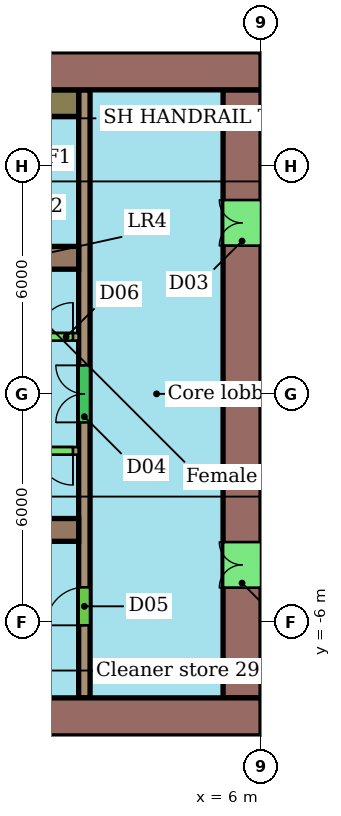
"""IFC4 building model, lengths in metres.
Left out: names, types, materials, properties, quantities, classifications, styles, units other than length and angle.
Written with IfcOpenShell. Run it as: python <this file> out.ifc"""

import sys

from ifc_helpers import new_model, si_unit, direction, frame, frame_2d, origin, place, context, subcontext, project, spatial, rectangle, extrude, element, fill, save


model = new_model("IFC4")
c1 = context("Model", 3, precision=1e-05, world=origin(), true_north=direction((0.0, 1.0)))
c2 = subcontext(c1, "Body", "Model", "MODEL_VIEW")
j1 = project(units=[si_unit("LENGTHUNIT", "METRE"), si_unit("PLANEANGLEUNIT", "RADIAN")], contexts=[c1])
p1 = place(None, origin())
s1 = spatial("IfcSite", under=j1, at=p1, CompositionType="ELEMENT")
p2 = place(p1, origin())
s2 = spatial("IfcBuilding", under=s1, at=p2, CompositionType="ELEMENT")
p3 = place(p2, frame((0.0, 0.0, 124.6)))
s3 = spatial("IfcBuildingStorey", under=s2, at=p3, CompositionType="ELEMENT", Elevation=124.6)
p4 = place(p3, frame((6.0, 8.5, 0.0), z_axis=(0.0, 0.0, 1.0), x_axis=(-1.0, 0.0, 0.0)))
e1 = element("IfcWall", 1, at=p4, inside=s3, PredefinedType="SHEAR", context=c2, shape_type="SweptSolid", body=[
    extrude(rectangle(XDim=12.0, YDim=1.0, at=frame_2d((6.0, 0.0))), origin(), (0.0, 0.0, 1.0), 3.3),
])
p5 = place(p4, frame((5.6, 0.0, 0.0)))
e2 = element("IfcOpeningElement", 2, at=p5, cuts=e1, PredefinedType="OPENING", context=c2, shape_type="SweptSolid", body=[
    extrude(rectangle(XDim=1.2, YDim=2.1, at=frame_2d((0.6, 1.05))), frame((0.0, 0.51, 0.0), z_axis=(0.0, -1.0, 0.0), x_axis=(1.0, 0.0, 0.0)), (0.0, 0.0, 1.0), 1.02),
])
p6 = place(p3, frame((-18.0, -8.5, 0.0), z_axis=(0.0, 0.0, 1.0), x_axis=(1.0, 0.0, 0.0)))
e3 = element("IfcWall", 3, at=p6, inside=s3, PredefinedType="SHEAR", context=c2, shape_type="SweptSolid", body=[
    extrude(rectangle(XDim=24.0, YDim=1.0, at=frame_2d((12.0, 0.0))), origin(), (0.0, 0.0, 1.0), 3.3),
])
p7 = place(p6, frame((6.0, 0.0, 0.0)))
e4 = element("IfcOpeningElement", 4, at=p7, cuts=e3, PredefinedType="OPENING", context=c2, shape_type="SweptSolid", body=[
    extrude(rectangle(XDim=1.2, YDim=2.1, at=frame_2d((0.6, 1.05))), frame((0.0, 0.51, 0.0), z_axis=(0.0, -1.0, 0.0), x_axis=(1.0, 0.0, 0.0)), (0.0, 0.0, 1.0), 1.02),
])
p8 = place(p3, frame((5.5, -8.0, 0.0), z_axis=(0.0, 0.0, 1.0), x_axis=(0.0, 1.0, 0.0)))
e5 = element("IfcWall", 5, at=p8, inside=s3, PredefinedType="SHEAR", context=c2, shape_type="SweptSolid", body=[
    extrude(rectangle(XDim=16.0, YDim=1.0, at=frame_2d((8.0, 0.0))), origin(), (0.0, 0.0, 1.0), 3.3),
])
p9 = place(p8, frame((2.9, 0.0, 0.0)))
e6 = element("IfcOpeningElement", 6, at=p9, cuts=e5, PredefinedType="OPENING", context=c2, shape_type="SweptSolid", body=[
    extrude(rectangle(XDim=1.2, YDim=2.1, at=frame_2d((0.6, 1.05))), frame((0.0, 0.51, 0.0), z_axis=(0.0, -1.0, 0.0), x_axis=(1.0, 0.0, 0.0)), (0.0, 0.0, 1.0), 1.02),
])
p10 = place(p8, frame((11.9, 0.0, 0.0)))
e7 = element("IfcOpeningElement", 7, at=p10, cuts=e5, PredefinedType="OPENING", context=c2, shape_type="SweptSolid", body=[
    extrude(rectangle(XDim=1.2, YDim=2.1, at=frame_2d((0.6, 1.05))), frame((0.0, 0.51, 0.0), z_axis=(0.0, -1.0, 0.0), x_axis=(1.0, 0.0, 0.0)), (0.0, 0.0, 1.0), 1.02),
])
for number, where, z_axis, x_axis in (
    (8, (-6.0, 3.58, 0.0), (0.0, 0.0, 1.0), (1.0, 0.0, 0.0)),
    (9, (-6.0, -3.58, 0.0), (0.0, 0.0, 1.0), (1.0, 0.0, 0.0)),
):
    element("IfcWall", number, at=place(p3, frame(where, z_axis=z_axis, x_axis=x_axis)), inside=s3, PredefinedType="SHEAR", context=c2, shape_type="SweptSolid", body=[
        extrude(rectangle(XDim=7.2, YDim=0.6, at=frame_2d((3.6, 0.0))), origin(), (0.0, 0.0, 1.0), 3.3),
    ])
p11 = place(p3, frame((1.35, -8.0, 0.0), z_axis=(0.0, 0.0, 1.0), x_axis=(0.0, 1.0, 0.0)))
e10 = element("IfcWall", 10, at=p11, inside=s3, PredefinedType="SHEAR", context=c2, shape_type="SweptSolid", body=[
    extrude(rectangle(XDim=16.0, YDim=0.3, at=frame_2d((8.0, 0.0))), origin(), (0.0, 0.0, 1.0), 3.3),
])
p12 = place(p11, frame((1.91, 0.0, 0.0)))
e11 = element("IfcOpeningElement", 11, at=p12, cuts=e10, PredefinedType="OPENING", context=c2, shape_type="SweptSolid", body=[
    extrude(rectangle(XDim=1.0, YDim=2.1, at=frame_2d((0.5, 1.05))), frame((0.0, 0.16, 0.0), z_axis=(0.0, -1.0, 0.0), x_axis=(1.0, 0.0, 0.0)), (0.0, 0.0, 1.0), 0.32),
])
p13 = place(p11, frame((7.25, 0.0, 0.0)))
e12 = element("IfcOpeningElement", 12, at=p13, cuts=e10, PredefinedType="OPENING", context=c2, shape_type="SweptSolid", body=[
    extrude(rectangle(XDim=1.5, YDim=2.1, at=frame_2d((0.75, 1.05))), frame((0.0, 0.16, 0.0), z_axis=(0.0, -1.0, 0.0), x_axis=(1.0, 0.0, 0.0)), (0.0, 0.0, 1.0), 0.32),
])
p14 = place(p3, frame((-13.2, 1.5, 0.0), z_axis=(0.0, 0.0, 1.0), x_axis=(1.0, 0.0, 0.0)))
e13 = element("IfcWall", 13, at=p14, inside=s3, PredefinedType="SHEAR", context=c2, shape_type="SweptSolid", body=[
    extrude(rectangle(XDim=14.4, YDim=0.2, at=frame_2d((7.2, 0.0))), origin(), (0.0, 0.0, 1.0), 3.3),
])
p15 = place(p14, frame((0.546, 0.0, 0.0)))
e14 = element("IfcOpeningElement", 14, at=p15, cuts=e13, PredefinedType="OPENING", context=c2, shape_type="SweptSolid", body=[
    extrude(rectangle(XDim=1.1, YDim=2.1, at=frame_2d((0.55, 1.05))), frame((0.0, 0.11, 0.0), z_axis=(0.0, -1.0, 0.0), x_axis=(1.0, 0.0, 0.0)), (0.0, 0.0, 1.0), 0.22),
])
p16 = place(p14, frame((2.988, 0.0, 0.0)))
e15 = element("IfcOpeningElement", 15, at=p16, cuts=e13, PredefinedType="OPENING", context=c2, shape_type="SweptSolid", body=[
    extrude(rectangle(XDim=1.1, YDim=2.1, at=frame_2d((0.55, 1.05))), frame((0.0, 0.11, 0.0), z_axis=(0.0, -1.0, 0.0), x_axis=(1.0, 0.0, 0.0)), (0.0, 0.0, 1.0), 0.22),
])
p17 = place(p14, frame((5.429, 0.0, 0.0)))
e16 = element("IfcOpeningElement", 16, at=p17, cuts=e13, PredefinedType="OPENING", context=c2, shape_type="SweptSolid", body=[
    extrude(rectangle(XDim=1.1, YDim=2.1, at=frame_2d((0.55, 1.05))), frame((0.0, 0.11, 0.0), z_axis=(0.0, -1.0, 0.0), x_axis=(1.0, 0.0, 0.0)), (0.0, 0.0, 1.0), 0.22),
])
p18 = place(p14, frame((7.871, 0.0, 0.0)))
e17 = element("IfcOpeningElement", 17, at=p18, cuts=e13, PredefinedType="OPENING", context=c2, shape_type="SweptSolid", body=[
    extrude(rectangle(XDim=1.1, YDim=2.1, at=frame_2d((0.55, 1.05))), frame((0.0, 0.11, 0.0), z_axis=(0.0, -1.0, 0.0), x_axis=(1.0, 0.0, 0.0)), (0.0, 0.0, 1.0), 0.22),
])
p19 = place(p14, frame((10.21, 0.0, 0.0)))
e18 = element("IfcOpeningElement", 18, at=p19, cuts=e13, PredefinedType="OPENING", context=c2, shape_type="SweptSolid", body=[
    extrude(rectangle(XDim=1.0, YDim=2.1, at=frame_2d((0.5, 1.05))), frame((0.0, 0.11, 0.0), z_axis=(0.0, -1.0, 0.0), x_axis=(1.0, 0.0, 0.0)), (0.0, 0.0, 1.0), 0.22),
])
p20 = place(p14, frame((13.35, 0.0, 0.0)))
e19 = element("IfcOpeningElement", 19, at=p20, cuts=e13, PredefinedType="OPENING", context=c2, shape_type="SweptSolid", body=[
    extrude(rectangle(XDim=0.9, YDim=2.1, at=frame_2d((0.45, 1.05))), frame((0.0, 0.11, 0.0), z_axis=(0.0, -1.0, 0.0), x_axis=(1.0, 0.0, 0.0)), (0.0, 0.0, 1.0), 0.22),
])
p21 = place(p3, frame((1.2, -1.5, 0.0), z_axis=(0.0, 0.0, 1.0), x_axis=(-1.0, 0.0, 0.0)))
e20 = element("IfcWall", 20, at=p21, inside=s3, PredefinedType="SHEAR", context=c2, shape_type="SweptSolid", body=[
    extrude(rectangle(XDim=14.4, YDim=0.2, at=frame_2d((7.2, 0.0))), origin(), (0.0, 0.0, 1.0), 3.3),
])
p22 = place(p21, frame((7.821, 0.0, 0.0)))
e21 = element("IfcOpeningElement", 21, at=p22, cuts=e20, PredefinedType="OPENING", context=c2, shape_type="SweptSolid", body=[
    extrude(rectangle(XDim=1.2, YDim=2.1, at=frame_2d((0.6, 1.05))), frame((0.0, 0.11, 0.0), z_axis=(0.0, -1.0, 0.0), x_axis=(1.0, 0.0, 0.0)), (0.0, 0.0, 1.0), 0.22),
])
p23 = place(p21, frame((0.15, 0.0, 0.0)))
e22 = element("IfcOpeningElement", 22, at=p23, cuts=e20, PredefinedType="OPENING", context=c2, shape_type="SweptSolid", body=[
    extrude(rectangle(XDim=0.9, YDim=2.1, at=frame_2d((0.45, 1.05))), frame((0.0, 0.11, 0.0), z_axis=(0.0, -1.0, 0.0), x_axis=(1.0, 0.0, 0.0)), (0.0, 0.0, 1.0), 0.22),
])
p24 = place(p3, frame((0.4, 7.65, 0.0), z_axis=(0.0, 0.0, 1.0), x_axis=(1.0, 0.0, 0.0)))
e23 = element("IfcWall", 23, at=p24, inside=s3, PredefinedType="SHEAR", context=c2, shape_type="SweptSolid", body=[
    extrude(rectangle(XDim=0.8, YDim=0.7, at=frame_2d((0.4, 0.0))), origin(), (0.0, 0.0, 1.0), 3.3),
])
p25 = place(p9, origin())
e24 = element("IfcDoor", 24, at=p25, inside=s3, OperationType="DOUBLE_DOOR_SINGLE_SWING", PredefinedType="NOTDEFINED", context=c2, shape_type="SweptSolid", body=[
    extrude(rectangle(XDim=1.2, YDim=2.1, at=frame_2d((0.6, 1.05))), frame((0.0, 0.025, 0.0), z_axis=(0.0, -1.0, 0.0), x_axis=(1.0, 0.0, 0.0)), (0.0, 0.0, 1.0), 0.05),
])
fill(e6, e24)
p26 = place(p10, origin())
e25 = element("IfcDoor", 25, at=p26, inside=s3, OperationType="DOUBLE_DOOR_SINGLE_SWING", PredefinedType="NOTDEFINED", context=c2, shape_type="SweptSolid", body=[
    extrude(rectangle(XDim=1.2, YDim=2.1, at=frame_2d((0.6, 1.05))), frame((0.0, 0.025, 0.0), z_axis=(0.0, -1.0, 0.0), x_axis=(1.0, 0.0, 0.0)), (0.0, 0.0, 1.0), 0.05),
])
fill(e7, e25)
p27 = place(p12, origin())
e26 = element("IfcDoor", 26, at=p27, inside=s3, OperationType="SINGLE_SWING_LEFT", PredefinedType="NOTDEFINED", context=c2, shape_type="SweptSolid", body=[
    extrude(rectangle(XDim=1.0, YDim=2.1, at=frame_2d((0.5, 1.05))), frame((0.0, 0.025, 0.0), z_axis=(0.0, -1.0, 0.0), x_axis=(1.0, 0.0, 0.0)), (0.0, 0.0, 1.0), 0.05),
])
fill(e11, e26)
p28 = place(p13, origin())
e27 = element("IfcDoor", 27, at=p28, inside=s3, OperationType="DOUBLE_DOOR_SINGLE_SWING", PredefinedType="NOTDEFINED", context=c2, shape_type="SweptSolid", body=[
    extrude(rectangle(XDim=1.5, YDim=2.1, at=frame_2d((0.75, 1.05))), frame((0.0, 0.025, 0.0), z_axis=(0.0, -1.0, 0.0), x_axis=(1.0, 0.0, 0.0)), (0.0, 0.0, 1.0), 0.05),
])
fill(e12, e27)
p29 = place(p20, origin())
e28 = element("IfcDoor", 28, at=p29, inside=s3, OperationType="SINGLE_SWING_RIGHT", PredefinedType="NOTDEFINED", context=c2, shape_type="SweptSolid", body=[
    extrude(rectangle(XDim=0.9, YDim=2.1, at=frame_2d((0.45, 1.05))), frame((0.0, 0.025, 0.0), z_axis=(0.0, -1.0, 0.0), x_axis=(1.0, 0.0, 0.0)), (0.0, 0.0, 1.0), 0.05),
])
fill(e19, e28)
p30 = place(p23, origin())
e29 = element("IfcDoor", 29, at=p30, inside=s3, OperationType="SINGLE_SWING_LEFT", PredefinedType="NOTDEFINED", context=c2, shape_type="SweptSolid", body=[
    extrude(rectangle(XDim=0.9, YDim=2.1, at=frame_2d((0.45, 1.05))), frame((0.0, 0.025, 0.0), z_axis=(0.0, -1.0, 0.0), x_axis=(1.0, 0.0, 0.0)), (0.0, 0.0, 1.0), 0.05),
])
fill(e22, e29)
save(model, sys.argv[1])
